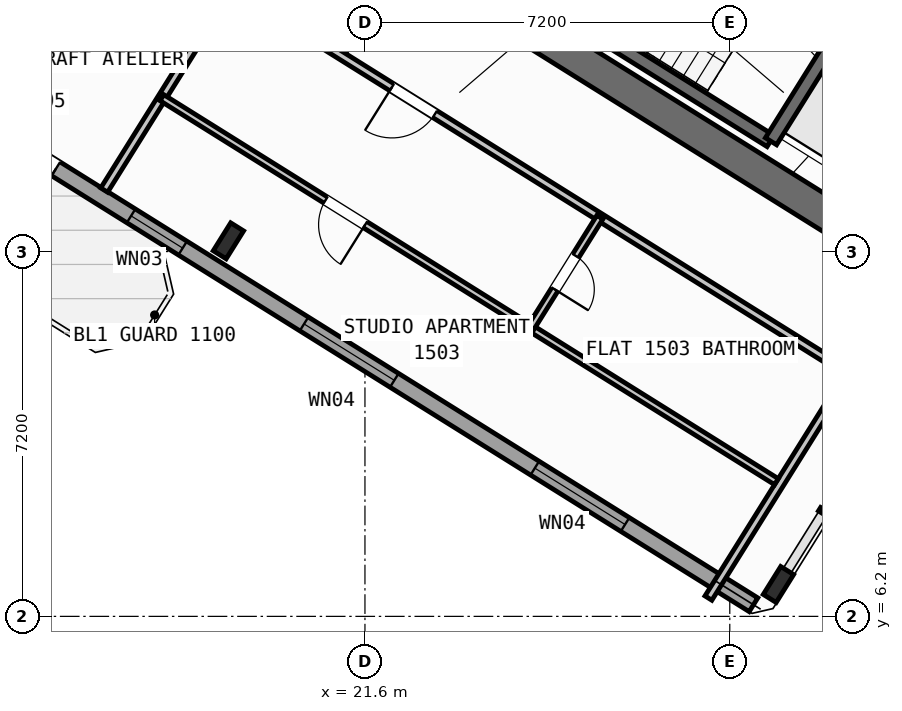
"""IFC4 building model, lengths in metres.
Left out: names, types, materials, properties, quantities, classifications, styles, units other than length and angle.
Written with IfcOpenShell. Run it as: python <this file> out.ifc"""

import sys

from ifc_helpers import new_model, si_unit, direction, frame, frame_2d, origin, origin_2d, place, context, subcontext, project, spatial, rectangle, i_section, extrude, source, transform, mapped, element, fill, save


model = new_model("IFC4")
c1 = context("Model", 3, precision=1e-05, world=origin(), true_north=direction((0.0, 1.0)))
c2 = subcontext(c1, "Body", "Model", "MODEL_VIEW")
j1 = project(units=[si_unit("LENGTHUNIT", "METRE"), si_unit("PLANEANGLEUNIT", "RADIAN")], contexts=[c1])
p1 = place(None, origin())
s1 = spatial("IfcSite", under=j1, at=p1, CompositionType="ELEMENT")
p2 = place(p1, origin())
s2 = spatial("IfcBuilding", under=s1, at=p2, CompositionType="ELEMENT")
p3 = place(p2, frame((0.0, 0.0, 60.0)))
s3 = spatial("IfcBuildingStorey", under=s2, at=p3, CompositionType="ELEMENT", Elevation=60.0)
p4 = place(p3, frame((33.409, 12.45, 0.0), z_axis=(0.0, 0.0, 1.0), x_axis=(-0.848051132073, 0.529914405721, 0.0)))
e1 = element("IfcWall", 1, at=p4, inside=s3, PredefinedType="SHEAR", context=c2, shape_type="SweptSolid", body=[
    extrude(rectangle(XDim=13.24, YDim=0.65, at=frame_2d((6.62, 0.0))), origin(), (0.0, 0.0, 1.0), 3.35),
])
m1 = source(origin(), c2, "Body", "SweptSolid", [
    extrude(i_section(OverallWidth=0.3, OverallDepth=0.65, WebThickness=0.016, FlangeThickness=0.031, at=origin_2d()), origin(), (0.0, 0.0, 1.0), 3.6),
])
for number, where, z_axis, x_axis in (
    (2, (29.761, 6.829, 0.0), (0.0, 0.0, 1.0), (-0.848, 0.53, 0.0)),
    (3, (18.906, 13.612, 0.0), (0.0, 0.0, 1.0), (-0.848, 0.53, 0.0)),
):
    element("IfcColumn", number, at=place(p3, frame(where, z_axis=z_axis, x_axis=x_axis)), inside=s3, PredefinedType="COLUMN", context=c2, shape_type="MappedRepresentation", body=[
        mapped(m1, transform((0.0, 0.0, 0.0), scale=1.0)),
    ])
p5 = place(p3, frame((29.268, 6.429, 0.0), z_axis=(0.0, 0.0, 1.0), x_axis=(-0.848049971435, 0.529916263149, 0.0)))
e4 = element("IfcWall", 4, at=p5, inside=s3, PredefinedType="STANDARD", context=c2, shape_type="SweptSolid", body=[
    extrude(rectangle(XDim=31.588, YDim=0.32, at=frame_2d((15.794, 0.0))), origin(), (0.0, 0.0, 1.0), 3.35),
])
p6 = place(p5, frame((16.235, 0.0, 0.0)))
e5 = element("IfcOpeningElement", 5, at=p6, cuts=e4, PredefinedType="OPENING", context=c2, shape_type="SweptSolid", body=[
    extrude(rectangle(XDim=1.2, YDim=2.15, at=frame_2d((0.6, 1.075))), frame((0.0, 0.17, 0.0), z_axis=(0.0, -1.0, 0.0), x_axis=(1.0, 0.0, 0.0)), (0.0, 0.0, 1.0), 0.34),
])
p7 = place(p5, frame((2.989, 0.0, 0.8)))
e6 = element("IfcOpeningElement", 6, at=p7, cuts=e4, PredefinedType="OPENING", context=c2, shape_type="SweptSolid", body=[
    extrude(rectangle(XDim=2.1, YDim=1.55, at=frame_2d((1.05, 0.775))), frame((0.0, 0.17, 0.0), z_axis=(0.0, -1.0, 0.0), x_axis=(1.0, 0.0, 0.0)), (0.0, 0.0, 1.0), 0.34),
])
p8 = place(p5, frame((8.359, 0.0, 0.8)))
e7 = element("IfcOpeningElement", 7, at=p8, cuts=e4, PredefinedType="OPENING", context=c2, shape_type="SweptSolid", body=[
    extrude(rectangle(XDim=2.1, YDim=1.55, at=frame_2d((1.05, 0.775))), frame((0.0, 0.17, 0.0), z_axis=(0.0, -1.0, 0.0), x_axis=(1.0, 0.0, 0.0)), (0.0, 0.0, 1.0), 0.34),
])
p9 = place(p5, frame((13.284, 0.0, 0.95)))
e8 = element("IfcOpeningElement", 8, at=p9, cuts=e4, PredefinedType="OPENING", context=c2, shape_type="SweptSolid", body=[
    extrude(rectangle(XDim=1.2, YDim=1.4, at=frame_2d((0.6, 0.7))), frame((0.0, 0.17, 0.0), z_axis=(0.0, -1.0, 0.0), x_axis=(1.0, 0.0, 0.0)), (0.0, 0.0, 1.0), 0.34),
])
p10 = place(p5, frame((22.374, 0.0, 0.95)))
e9 = element("IfcOpeningElement", 9, at=p10, cuts=e4, PredefinedType="OPENING", context=c2, shape_type="SweptSolid", body=[
    extrude(rectangle(XDim=1.2, YDim=1.4, at=frame_2d((0.6, 0.7))), frame((0.0, 0.17, 0.0), z_axis=(0.0, -1.0, 0.0), x_axis=(1.0, 0.0, 0.0)), (0.0, 0.0, 1.0), 0.34),
])
p11 = place(p5, frame((26.351, 0.0, 1.0)))
e10 = element("IfcOpeningElement", 10, at=p11, cuts=e4, PredefinedType="OPENING", context=c2, shape_type="SweptSolid", body=[
    extrude(rectangle(XDim=0.9, YDim=1.25, at=frame_2d((0.45, 0.625))), frame((0.0, 0.17, 0.0), z_axis=(0.0, -1.0, 0.0), x_axis=(1.0, 0.0, 0.0)), (0.0, 0.0, 1.0), 0.34),
])
p12 = place(p5, frame((29.052, 0.0, 0.85)))
e11 = element("IfcOpeningElement", 11, at=p12, cuts=e4, PredefinedType="OPENING", context=c2, shape_type="SweptSolid", body=[
    extrude(rectangle(XDim=1.8, YDim=1.5, at=frame_2d((0.9, 0.75))), frame((0.0, 0.17, 0.0), z_axis=(0.0, -1.0, 0.0), x_axis=(1.0, 0.0, 0.0)), (0.0, 0.0, 1.0), 0.34),
])
p13 = place(p3, frame((29.605, 15.581, 0.0), z_axis=(0.0, 0.0, 1.0), x_axis=(-0.848036911448, 0.529937163087, 0.0)))
e12 = element("IfcWall", 12, at=p13, inside=s3, PredefinedType="SHEAR", context=c2, shape_type="SweptSolid", body=[
    extrude(rectangle(XDim=7.46, YDim=0.26, at=frame_2d((3.73, 0.0))), origin(), (0.0, 0.0, 1.0), 3.35),
])
p14 = place(p3, frame((31.288, 18.256, 0.0), z_axis=(0.0, 0.0, 1.0), x_axis=(-0.529943379326, -0.848033026897, 0.0)))
e13 = element("IfcWall", 13, at=p14, inside=s3, PredefinedType="SHEAR", context=c2, shape_type="SweptSolid", body=[
    extrude(rectangle(XDim=3.16, YDim=0.26, at=frame_2d((1.58, 0.0))), origin(), (0.0, 0.0, 1.0), 3.35),
])
p15 = place(p3, frame((21.206, 17.292, 0.0), z_axis=(0.0, 0.0, 1.0), x_axis=(-0.848050851465, 0.529914854792, 0.0)))
e14 = element("IfcWall", 14, at=p15, inside=s3, PredefinedType="PARTITIONING", context=c2, shape_type="SweptSolid", body=[
    extrude(rectangle(XDim=2.61, YDim=0.16, at=frame_2d((1.305, 0.0))), origin(), (0.0, 0.0, 1.0), 3.34),
])
p16 = place(p3, frame((20.719, 21.44, 0.0), z_axis=(0.0, 0.0, 1.0), x_axis=(-0.529906246318, -0.848056230514, 0.0)))
e15 = element("IfcWall", 15, at=p16, inside=s3, PredefinedType="PARTITIONING", context=c2, shape_type="SweptSolid", body=[
    extrude(rectangle(XDim=8.05, YDim=0.16, at=frame_2d((4.025, 0.0))), origin(), (0.0, 0.0, 1.0), 3.34),
])
p17 = place(p3, frame((18.31, 22.946, 0.0), z_axis=(0.0, 0.0, 1.0), x_axis=(-0.529914428959, -0.848051117552, 0.0)))
e16 = element("IfcWall", 16, at=p17, inside=s3, PredefinedType="PARTITIONING", context=c2, shape_type="SweptSolid", body=[
    extrude(rectangle(XDim=8.05, YDim=0.16, at=frame_2d((4.025, 0.0))), origin(), (0.0, 0.0, 1.0), 3.34),
])
p18 = place(p3, frame((32.164, 10.374, 0.0), z_axis=(0.0, 0.0, 1.0), x_axis=(-0.848044107957, 0.529925646633, 0.0)))
e17 = element("IfcWall", 17, at=p18, inside=s3, PredefinedType="PARTITIONING", context=c2, shape_type="SweptSolid", body=[
    extrude(rectangle(XDim=15.57, YDim=0.16, at=frame_2d((7.785, 0.0))), origin(), (0.0, 0.0, 1.0), 3.34),
])
p19 = place(p18, frame((10.83, 0.0, 0.0)))
e18 = element("IfcOpeningElement", 18, at=p19, cuts=e17, PredefinedType="OPENING", context=c2, shape_type="SweptSolid", body=[
    extrude(rectangle(XDim=1.0, YDim=2.1, at=frame_2d((0.5, 1.05))), frame((0.0, 0.09, 0.0), z_axis=(0.0, -1.0, 0.0), x_axis=(1.0, 0.0, 0.0)), (0.0, 0.0, 1.0), 0.18),
])
p20 = place(p3, frame((31.282, 11.208, 0.0), z_axis=(0.0, 0.0, 1.0), x_axis=(-0.529938869374, -0.84803584519, 0.0)))
e19 = element("IfcWall", 19, at=p20, inside=s3, PredefinedType="PARTITIONING", context=c2, shape_type="SweptSolid", body=[
    extrude(rectangle(XDim=5.48, YDim=0.16, at=frame_2d((2.74, 0.0))), origin(), (0.0, 0.0, 1.0), 3.34),
])
p21 = place(p3, frame((29.72, 8.859, 0.0), z_axis=(0.0, 0.0, 1.0), x_axis=(-0.848049134363, 0.529917602752, 0.0)))
e20 = element("IfcWall", 20, at=p21, inside=s3, PredefinedType="PLUMBINGWALL", context=c2, shape_type="SweptSolid", body=[
    extrude(rectangle(XDim=14.3, YDim=0.14, at=frame_2d((7.15, 0.0))), origin(), (0.0, 0.0, 1.0), 3.34),
])
p22 = place(p21, frame((9.57, 0.0, 0.0)))
e21 = element("IfcOpeningElement", 21, at=p22, cuts=e20, PredefinedType="OPENING", context=c2, shape_type="SweptSolid", body=[
    extrude(rectangle(XDim=0.92, YDim=2.08, at=frame_2d((0.46, 1.04))), frame((0.0, 0.08, 0.0), z_axis=(0.0, -1.0, 0.0), x_axis=(1.0, 0.0, 0.0)), (0.0, 0.0, 1.0), 0.16),
])
p23 = place(p3, frame((26.237, 14.078, 0.0), z_axis=(0.0, 0.0, 1.0), x_axis=(-0.52995640672, -0.848024885824, 0.0)))
e22 = element("IfcWall", 22, at=p23, inside=s3, PredefinedType="PLUMBINGWALL", context=c2, shape_type="SweptSolid", body=[
    extrude(rectangle(XDim=2.58, YDim=0.14, at=frame_2d((1.29, 0.0))), origin(), (0.0, 0.0, 1.0), 3.34),
])
p24 = place(p23, frame((0.9, 0.0, 0.0)))
e23 = element("IfcOpeningElement", 23, at=p24, cuts=e22, PredefinedType="OPENING", context=c2, shape_type="SweptSolid", body=[
    extrude(rectangle(XDim=0.78, YDim=2.05, at=frame_2d((0.39, 1.025))), frame((0.0, 0.08, 0.0), z_axis=(0.0, -1.0, 0.0), x_axis=(1.0, 0.0, 0.0)), (0.0, 0.0, 1.0), 0.16),
])
m2 = source(origin(), c2, "Body", "SweptSolid", [
    extrude(rectangle(XDim=1.2, YDim=2.15, at=frame_2d((0.6, 1.075))), frame((0.0, 0.025, 0.0), z_axis=(0.0, -1.0, 0.0), x_axis=(1.0, 0.0, 0.0)), (0.0, 0.0, 1.0), 0.05),
])
p25 = place(p6, origin())
e24 = element("IfcDoor", 24, at=p25, inside=s3, OperationType="SINGLE_SWING_LEFT", PredefinedType="DOOR", context=c2, shape_type="MappedRepresentation", body=[
    mapped(m2, transform((0.0, 0.0, 0.0), scale=1.0)),
])
fill(e5, e24)
m3 = source(origin(), c2, "Body", "SweptSolid", [
    extrude(rectangle(XDim=2.1, YDim=1.55, at=frame_2d((1.05, 0.775))), frame((0.0, 0.03, 0.0), z_axis=(0.0, -1.0, 0.0), x_axis=(1.0, 0.0, 0.0)), (0.0, 0.0, 1.0), 0.06),
])
p26 = place(p7, origin())
e25 = element("IfcWindow", 25, at=p26, inside=s3, PartitioningType="SINGLE_PANEL", PredefinedType="WINDOW", context=c2, shape_type="MappedRepresentation", body=[
    mapped(m3, transform((0.0, 0.0, 0.0), scale=1.0)),
])
fill(e6, e25)
p27 = place(p8, origin())
e26 = element("IfcWindow", 26, at=p27, inside=s3, PartitioningType="SINGLE_PANEL", PredefinedType="WINDOW", context=c2, shape_type="MappedRepresentation", body=[
    mapped(m3, transform((0.0, 0.0, 0.0), scale=1.0)),
])
fill(e7, e26)
m4 = source(origin(), c2, "Body", "SweptSolid", [
    extrude(rectangle(XDim=1.2, YDim=1.4, at=frame_2d((0.6, 0.7))), frame((0.0, 0.03, 0.0), z_axis=(0.0, -1.0, 0.0), x_axis=(1.0, 0.0, 0.0)), (0.0, 0.0, 1.0), 0.06),
])
p28 = place(p9, origin())
e27 = element("IfcWindow", 27, at=p28, inside=s3, PartitioningType="SINGLE_PANEL", PredefinedType="WINDOW", context=c2, shape_type="MappedRepresentation", body=[
    mapped(m4, transform((0.0, 0.0, 0.0), scale=1.0)),
])
fill(e8, e27)
m5 = source(origin(), c2, "Body", "SweptSolid", [
    extrude(rectangle(XDim=1.0, YDim=2.1, at=frame_2d((0.5, 1.05))), frame((0.0, 0.025, 0.0), z_axis=(0.0, -1.0, 0.0), x_axis=(1.0, 0.0, 0.0)), (0.0, 0.0, 1.0), 0.05),
])
p29 = place(p19, origin())
e28 = element("IfcDoor", 28, at=p29, inside=s3, OperationType="SINGLE_SWING_RIGHT", PredefinedType="DOOR", context=c2, shape_type="MappedRepresentation", body=[
    mapped(m5, transform((0.0, 0.0, 0.0), scale=1.0)),
])
fill(e18, e28)
m6 = source(origin(), c2, "Body", "SweptSolid", [
    extrude(rectangle(XDim=0.92, YDim=2.08, at=frame_2d((0.46, 1.04))), frame((0.0, 0.025, 0.0), z_axis=(0.0, -1.0, 0.0), x_axis=(1.0, 0.0, 0.0)), (0.0, 0.0, 1.0), 0.05),
])
p30 = place(p22, origin())
e29 = element("IfcDoor", 29, at=p30, inside=s3, OperationType="SINGLE_SWING_LEFT", PredefinedType="DOOR", context=c2, shape_type="MappedRepresentation", body=[
    mapped(m6, transform((0.0, 0.0, 0.0), scale=1.0)),
])
fill(e21, e29)
m7 = source(origin(), c2, "Body", "SweptSolid", [
    extrude(rectangle(XDim=0.78, YDim=2.05, at=frame_2d((0.39, 1.025))), frame((0.0, 0.025, 0.0), z_axis=(0.0, -1.0, 0.0), x_axis=(1.0, 0.0, 0.0)), (0.0, 0.0, 1.0), 0.05),
])
p31 = place(p24, origin())
e30 = element("IfcDoor", 30, at=p31, inside=s3, OperationType="SINGLE_SWING_RIGHT", PredefinedType="DOOR", context=c2, shape_type="MappedRepresentation", body=[
    mapped(m7, transform((0.0, 0.0, 0.0), scale=1.0)),
])
fill(e23, e30)
save(model, sys.argv[1])
